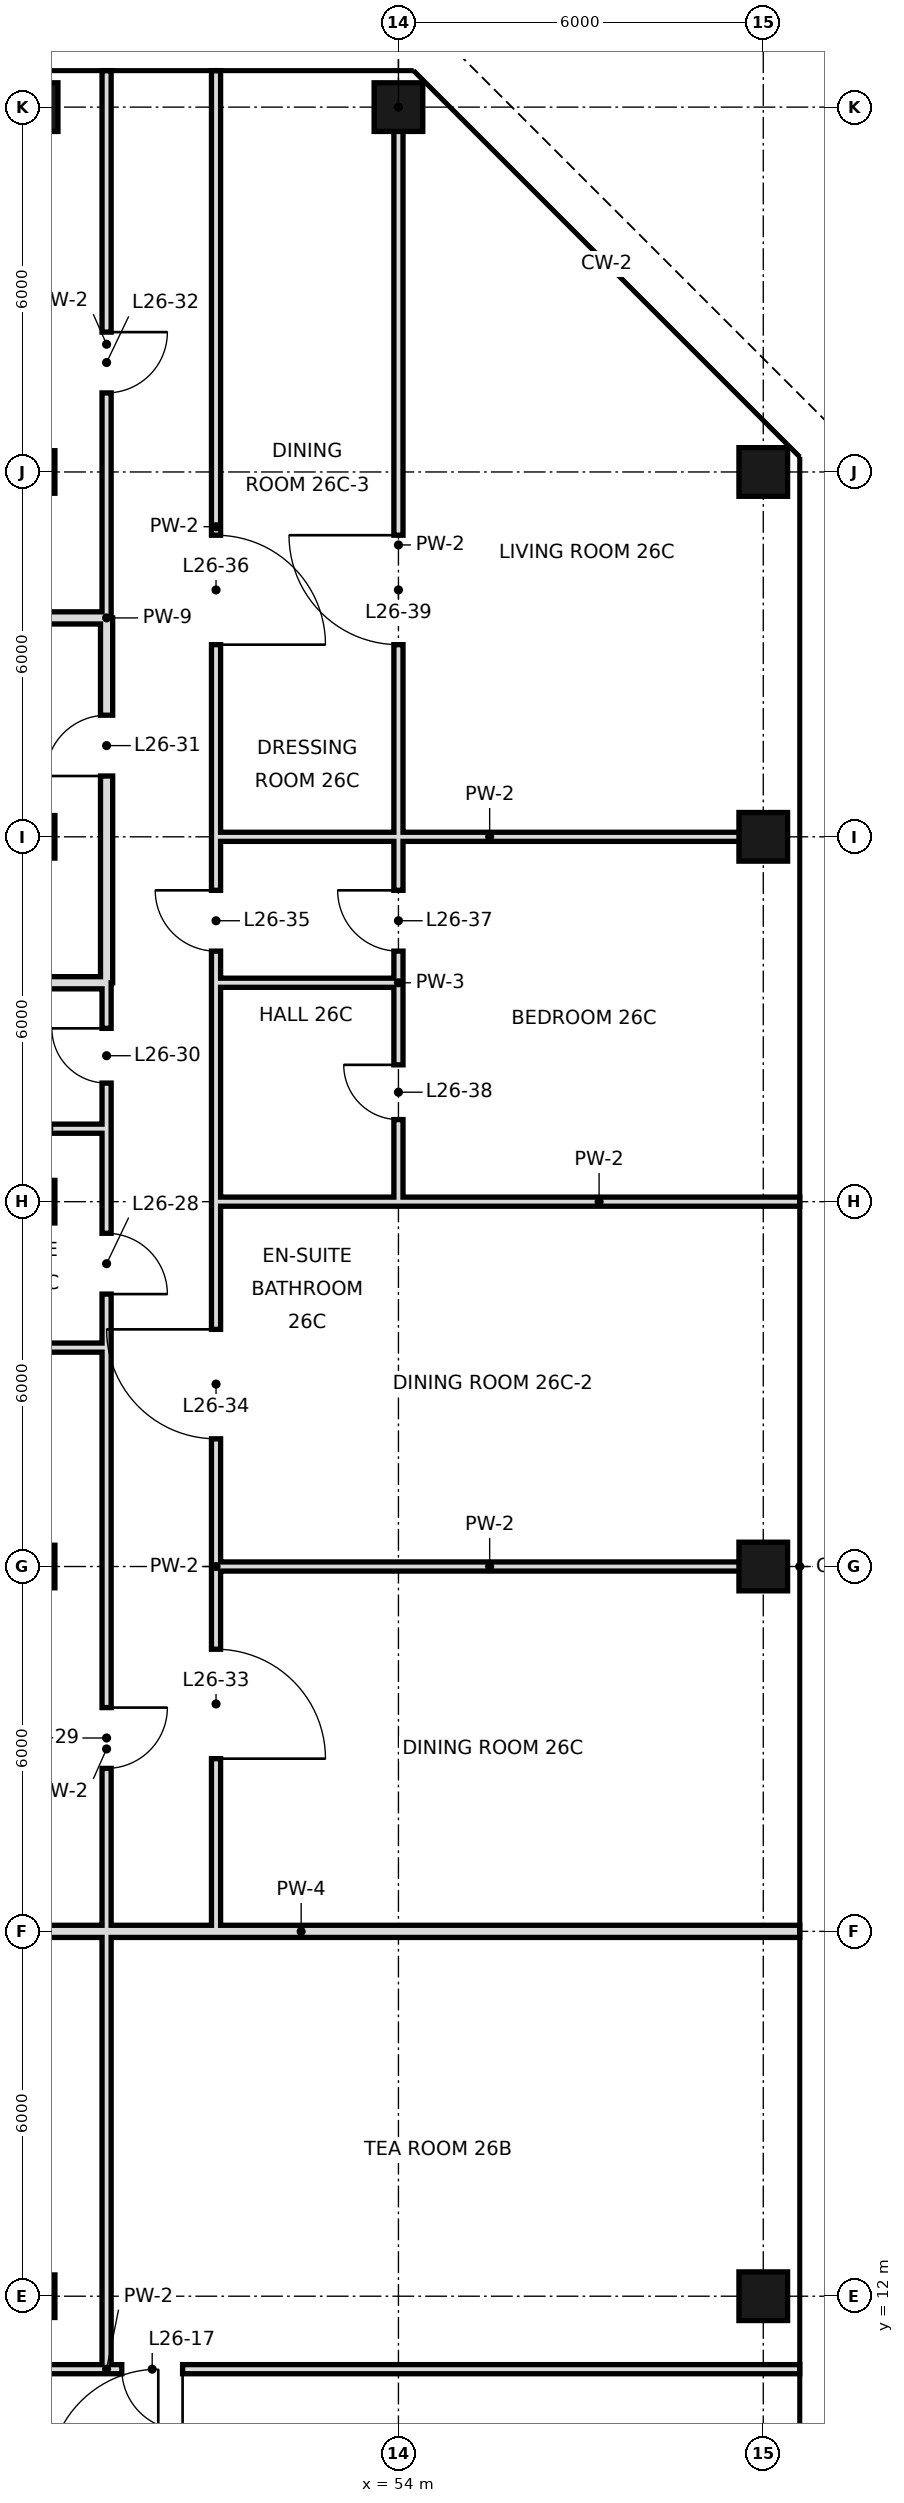
"""IFC4 building model, lengths in metres.
Left out: names, types, materials, properties, quantities, classifications, styles, units other than length and angle.
Written with IfcOpenShell. Run it as: python <this file> out.ifc"""

import sys

from ifc_helpers import new_model, si_unit, direction, frame, frame_2d, origin, origin_2d, place, context, subcontext, project, spatial, rectangle, hollow_rectangle, extrude, element, fill, save


model = new_model("IFC4")
c1 = context("Model", 3, precision=1e-05, world=origin(), true_north=direction((0.0, 1.0)))
c2 = subcontext(c1, "Body", "Model", "MODEL_VIEW")
j1 = project(units=[si_unit("LENGTHUNIT", "METRE"), si_unit("PLANEANGLEUNIT", "RADIAN")], contexts=[c1])
p1 = place(None, origin())
s1 = spatial("IfcSite", under=j1, at=p1, CompositionType="ELEMENT")
p2 = place(p1, origin())
s2 = spatial("IfcBuilding", under=s1, at=p2, CompositionType="ELEMENT")
p3 = place(p2, frame((0.0, 0.0, 119.6)))
s3 = spatial("IfcBuildingStorey", under=s2, at=p3, CompositionType="ELEMENT", Elevation=119.6)
for number, where, z_axis, x_axis in (
    (1, (48.0, 12.0, 0.0), (0.0, 0.0, 1.0), (1.0, 0.0, 0.0)),
    (2, (48.0, 24.0, 0.0), (0.0, 0.0, 1.0), (1.0, 0.0, 0.0)),
    (3, (48.0, 30.0, 0.0), (0.0, 0.0, 1.0), (1.0, 0.0, 0.0)),
    (4, (48.0, 36.0, 0.0), (0.0, 0.0, 1.0), (1.0, 0.0, 0.0)),
    (5, (48.0, 42.0, 0.0), (0.0, 0.0, 1.0), (1.0, 0.0, 0.0)),
):
    element("IfcColumn", number, at=place(p3, frame(where, z_axis=z_axis, x_axis=x_axis)), inside=s3, PredefinedType="COLUMN", context=c2, shape_type="SweptSolid", body=[
        extrude(hollow_rectangle(XDim=0.7, YDim=0.7, WallThickness=0.036, at=origin_2d()), origin(), (0.0, 0.0, 1.0), 3.6),
    ])
for number, where, z_axis, x_axis in (
    (6, (48.0, 48.0, 0.0), (0.0, 0.0, 1.0), (1.0, 0.0, 0.0)),
    (7, (54.0, 48.0, 0.0), (0.0, 0.0, 1.0), (1.0, 0.0, 0.0)),
    (8, (60.0, 12.0, 0.0), (0.0, 0.0, 1.0), (1.0, 0.0, 0.0)),
    (9, (60.0, 24.0, 0.0), (0.0, 0.0, 1.0), (1.0, 0.0, 0.0)),
    (10, (60.0, 36.0, 0.0), (0.0, 0.0, 1.0), (1.0, 0.0, 0.0)),
    (11, (60.0, 42.0, 0.0), (0.0, 0.0, 1.0), (1.0, 0.0, 0.0)),
):
    element("IfcColumn", number, at=place(p3, frame(where, z_axis=z_axis, x_axis=x_axis)), inside=s3, PredefinedType="COLUMN", context=c2, shape_type="SweptSolid", body=[
        extrude(hollow_rectangle(XDim=0.8, YDim=0.8, WallThickness=0.04, at=origin_2d()), origin(), (0.0, 0.0, 1.0), 3.6),
    ])
p4 = place(p3, frame((49.2, 33.6, 0.0), z_axis=(0.0, 0.0, 1.0), x_axis=(0.0, 1.0, 0.0)))
e12 = element("IfcWall", 12, at=p4, inside=s3, PredefinedType="SOLIDWALL", context=c2, shape_type="SweptSolid", body=[
    extrude(rectangle(XDim=6.0, YDim=0.2, at=frame_2d((3.0, 0.0))), origin(), (0.0, 0.0, 1.0), 2.72),
])
p5 = place(p4, frame((3.4, 0.0, 0.0)))
e13 = element("IfcOpeningElement", 13, at=p5, cuts=e12, PredefinedType="OPENING", context=c2, shape_type="SweptSolid", body=[
    extrude(rectangle(XDim=1.0, YDim=2.4, at=frame_2d((0.5, 1.2))), frame((0.0, 0.11, 0.0), z_axis=(0.0, -1.0, 0.0), x_axis=(1.0, 0.0, 0.0)), (0.0, 0.0, 1.0), 0.22),
])
p6 = place(p3, frame((49.2, 10.8, 0.0), z_axis=(0.0, 0.0, 1.0), x_axis=(0.0, 1.0, 0.0)))
e14 = element("IfcWall", 14, at=p6, inside=s3, PredefinedType="PARTITIONING", context=c2, shape_type="SweptSolid", body=[
    extrude(rectangle(XDim=20.4, YDim=0.15, at=frame_2d((10.2, 0.0))), origin(), (0.0, 0.0, 1.0), 3.42),
])
p7 = place(p6, frame((17.68, 0.0, 0.0)))
e15 = element("IfcOpeningElement", 15, at=p7, cuts=e14, PredefinedType="OPENING", context=c2, shape_type="SweptSolid", body=[
    extrude(rectangle(XDim=1.0, YDim=2.4, at=frame_2d((0.5, 1.2))), frame((0.0, 0.085, 0.0), z_axis=(0.0, -1.0, 0.0), x_axis=(1.0, 0.0, 0.0)), (0.0, 0.0, 1.0), 0.17),
])
p8 = place(p6, frame((9.88, 0.0, 0.0)))
e16 = element("IfcOpeningElement", 16, at=p8, cuts=e14, PredefinedType="OPENING", context=c2, shape_type="SweptSolid", body=[
    extrude(rectangle(XDim=1.0, YDim=2.4, at=frame_2d((0.5, 1.2))), frame((0.0, 0.085, 0.0), z_axis=(0.0, -1.0, 0.0), x_axis=(1.0, 0.0, 0.0)), (0.0, 0.0, 1.0), 0.17),
])
p9 = place(p3, frame((49.2, 39.6, 0.0), z_axis=(0.0, 0.0, 1.0), x_axis=(0.0, 1.0, 0.0)))
e17 = element("IfcWall", 17, at=p9, inside=s3, PredefinedType="PARTITIONING", context=c2, shape_type="SweptSolid", body=[
    extrude(rectangle(XDim=9.0, YDim=0.15, at=frame_2d((4.5, 0.0))), origin(), (0.0, 0.0, 1.0), 3.42),
])
p10 = place(p9, frame((3.7, 0.0, 0.0)))
e18 = element("IfcOpeningElement", 18, at=p10, cuts=e17, PredefinedType="OPENING", context=c2, shape_type="SweptSolid", body=[
    extrude(rectangle(XDim=1.0, YDim=2.4, at=frame_2d((0.5, 1.2))), frame((0.0, 0.085, 0.0), z_axis=(0.0, -1.0, 0.0), x_axis=(1.0, 0.0, 0.0)), (0.0, 0.0, 1.0), 0.17),
])
p11 = place(p3, frame((49.2, 31.2, 0.0), z_axis=(0.0, 0.0, 1.0), x_axis=(0.0, 1.0, 0.0)))
e19 = element("IfcWall", 19, at=p11, inside=s3, PredefinedType="PARTITIONING", context=c2, shape_type="SweptSolid", body=[
    extrude(rectangle(XDim=2.4, YDim=0.15, at=frame_2d((1.2, 0.0))), origin(), (0.0, 0.0, 1.0), 3.42),
])
p12 = place(p11, frame((0.75, 0.0, 0.0)))
e20 = element("IfcOpeningElement", 20, at=p12, cuts=e19, PredefinedType="OPENING", context=c2, shape_type="SweptSolid", body=[
    extrude(rectangle(XDim=0.9, YDim=2.4, at=frame_2d((0.45, 1.2))), frame((0.0, 0.085, 0.0), z_axis=(0.0, -1.0, 0.0), x_axis=(1.0, 0.0, 0.0)), (0.0, 0.0, 1.0), 0.17),
])
p13 = place(p3, frame((51.0, 18.0, 0.0), z_axis=(0.0, 0.0, 1.0), x_axis=(0.0, 1.0, 0.0)))
e21 = element("IfcWall", 21, at=p13, inside=s3, PredefinedType="PARTITIONING", context=c2, shape_type="SweptSolid", body=[
    extrude(rectangle(XDim=12.0, YDim=0.15, at=frame_2d((6.0, 0.0))), origin(), (0.0, 0.0, 1.0), 3.42),
])
p14 = place(p13, frame((2.84, 0.0, 0.0)))
e22 = element("IfcOpeningElement", 22, at=p14, cuts=e21, PredefinedType="OPENING", context=c2, shape_type="SweptSolid", body=[
    extrude(rectangle(XDim=1.8, YDim=2.4, at=frame_2d((0.9, 1.2))), frame((0.0, 0.085, 0.0), z_axis=(0.0, -1.0, 0.0), x_axis=(1.0, 0.0, 0.0)), (0.0, 0.0, 1.0), 0.17),
])
p15 = place(p13, frame((8.1, 0.0, 0.0)))
e23 = element("IfcOpeningElement", 23, at=p15, cuts=e21, PredefinedType="OPENING", context=c2, shape_type="SweptSolid", body=[
    extrude(rectangle(XDim=1.8, YDim=2.4, at=frame_2d((0.9, 1.2))), frame((0.0, 0.085, 0.0), z_axis=(0.0, -1.0, 0.0), x_axis=(1.0, 0.0, 0.0)), (0.0, 0.0, 1.0), 0.17),
])
p16 = place(p3, frame((51.0, 33.6, 0.0), z_axis=(0.0, 0.0, 1.0), x_axis=(0.0, 1.0, 0.0)))
e24 = element("IfcWall", 24, at=p16, inside=s3, PredefinedType="PARTITIONING", context=c2, shape_type="SweptSolid", body=[
    extrude(rectangle(XDim=15.0, YDim=0.15, at=frame_2d((7.5, 0.0))), origin(), (0.0, 0.0, 1.0), 3.42),
])
p17 = place(p16, frame((0.52, 0.0, 0.0)))
e25 = element("IfcOpeningElement", 25, at=p17, cuts=e24, PredefinedType="OPENING", context=c2, shape_type="SweptSolid", body=[
    extrude(rectangle(XDim=1.0, YDim=2.4, at=frame_2d((0.5, 1.2))), frame((0.0, 0.085, 0.0), z_axis=(0.0, -1.0, 0.0), x_axis=(1.0, 0.0, 0.0)), (0.0, 0.0, 1.0), 0.17),
])
p18 = place(p16, frame((5.56, 0.0, 0.0)))
e26 = element("IfcOpeningElement", 26, at=p18, cuts=e24, PredefinedType="OPENING", context=c2, shape_type="SweptSolid", body=[
    extrude(rectangle(XDim=1.8, YDim=2.4, at=frame_2d((0.9, 1.2))), frame((0.0, 0.085, 0.0), z_axis=(0.0, -1.0, 0.0), x_axis=(1.0, 0.0, 0.0)), (0.0, 0.0, 1.0), 0.17),
])
p19 = place(p3, frame((51.0, 30.0, 0.0), z_axis=(0.0, 0.0, 1.0), x_axis=(0.0, 1.0, 0.0)))
e27 = element("IfcWall", 27, at=p19, inside=s3, PredefinedType="PARTITIONING", context=c2, shape_type="SweptSolid", body=[
    extrude(rectangle(XDim=3.6, YDim=0.15, at=frame_2d((1.8, 0.0))), origin(), (0.0, 0.0, 1.0), 3.42),
])
p20 = place(p3, frame((54.0, 33.6, 0.0), z_axis=(0.0, 0.0, 1.0), x_axis=(0.0, 1.0, 0.0)))
e28 = element("IfcWall", 28, at=p20, inside=s3, PredefinedType="PARTITIONING", context=c2, shape_type="SweptSolid", body=[
    extrude(rectangle(XDim=14.4, YDim=0.15, at=frame_2d((7.2, 0.0))), origin(), (0.0, 0.0, 1.0), 3.42),
])
p21 = place(p20, frame((0.52, 0.0, 0.0)))
e29 = element("IfcOpeningElement", 29, at=p21, cuts=e28, PredefinedType="OPENING", context=c2, shape_type="SweptSolid", body=[
    extrude(rectangle(XDim=1.0, YDim=2.4, at=frame_2d((0.5, 1.2))), frame((0.0, 0.085, 0.0), z_axis=(0.0, -1.0, 0.0), x_axis=(1.0, 0.0, 0.0)), (0.0, 0.0, 1.0), 0.17),
])
p22 = place(p20, frame((5.56, 0.0, 0.0)))
e30 = element("IfcOpeningElement", 30, at=p22, cuts=e28, PredefinedType="OPENING", context=c2, shape_type="SweptSolid", body=[
    extrude(rectangle(XDim=1.8, YDim=2.4, at=frame_2d((0.9, 1.2))), frame((0.0, 0.085, 0.0), z_axis=(0.0, -1.0, 0.0), x_axis=(1.0, 0.0, 0.0)), (0.0, 0.0, 1.0), 0.17),
])
p23 = place(p3, frame((54.0, 30.0, 0.0), z_axis=(0.0, 0.0, 1.0), x_axis=(0.0, 1.0, 0.0)))
e31 = element("IfcWall", 31, at=p23, inside=s3, PredefinedType="PARTITIONING", context=c2, shape_type="SweptSolid", body=[
    extrude(rectangle(XDim=3.6, YDim=0.15, at=frame_2d((1.8, 0.0))), origin(), (0.0, 0.0, 1.0), 3.42),
])
p24 = place(p23, frame((1.35, 0.0, 0.0)))
e32 = element("IfcOpeningElement", 32, at=p24, cuts=e31, PredefinedType="OPENING", context=c2, shape_type="SweptSolid", body=[
    extrude(rectangle(XDim=0.9, YDim=2.4, at=frame_2d((0.45, 1.2))), frame((0.0, 0.085, 0.0), z_axis=(0.0, -1.0, 0.0), x_axis=(1.0, 0.0, 0.0)), (0.0, 0.0, 1.0), 0.17),
])
p25 = place(p3, frame((37.8, 10.8, 0.0), z_axis=(0.0, 0.0, 1.0), x_axis=(1.0, 0.0, 0.0)))
e33 = element("IfcWall", 33, at=p25, inside=s3, PredefinedType="PARTITIONING", context=c2, shape_type="SweptSolid", body=[
    extrude(rectangle(XDim=22.8, YDim=0.15, at=frame_2d((11.4, 0.0))), origin(), (0.0, 0.0, 1.0), 3.42),
])
p26 = place(p25, frame((5.2, 0.0, 0.0)))
e34 = element("IfcOpeningElement", 34, at=p26, cuts=e33, PredefinedType="OPENING", context=c2, shape_type="SweptSolid", body=[
    extrude(rectangle(XDim=1.0, YDim=2.4, at=frame_2d((0.5, 1.2))), frame((0.0, 0.085, 0.0), z_axis=(0.0, -1.0, 0.0), x_axis=(1.0, 0.0, 0.0)), (0.0, 0.0, 1.0), 0.17),
])
p27 = place(p25, frame((11.65, 0.0, 0.0)))
e35 = element("IfcOpeningElement", 35, at=p27, cuts=e33, PredefinedType="OPENING", context=c2, shape_type="SweptSolid", body=[
    extrude(rectangle(XDim=1.0, YDim=2.4, at=frame_2d((0.5, 1.2))), frame((0.0, 0.085, 0.0), z_axis=(0.0, -1.0, 0.0), x_axis=(1.0, 0.0, 0.0)), (0.0, 0.0, 1.0), 0.17),
])
p28 = place(p3, frame((44.9, 18.0, 0.0), z_axis=(0.0, 0.0, 1.0), x_axis=(1.0, 0.0, 0.0)))
e36 = element("IfcWall", 36, at=p28, inside=s3, PredefinedType="SOLIDWALL", context=c2, shape_type="SweptSolid", body=[
    extrude(rectangle(XDim=15.7, YDim=0.2, at=frame_2d((7.85, 0.0))), origin(), (0.0, 0.0, 1.0), 2.72),
])
p29 = place(p3, frame((51.0, 24.0, 0.0), z_axis=(0.0, 0.0, 1.0), x_axis=(1.0, 0.0, 0.0)))
e37 = element("IfcWall", 37, at=p29, inside=s3, PredefinedType="PARTITIONING", context=c2, shape_type="SweptSolid", body=[
    extrude(rectangle(XDim=9.0, YDim=0.15, at=frame_2d((4.5, 0.0))), origin(), (0.0, 0.0, 1.0), 2.72),
])
p30 = place(p3, frame((44.9, 27.6, 0.0), z_axis=(0.0, 0.0, 1.0), x_axis=(1.0, 0.0, 0.0)))
e38 = element("IfcWall", 38, at=p30, inside=s3, PredefinedType="PARTITIONING", context=c2, shape_type="SweptSolid", body=[
    extrude(rectangle(XDim=4.3, YDim=0.15, at=frame_2d((2.15, 0.0))), origin(), (0.0, 0.0, 1.0), 3.42),
])
p31 = place(p3, frame((54.0, 30.0, 0.0), z_axis=(0.0, 0.0, 1.0), x_axis=(1.0, 0.0, 0.0)))
e39 = element("IfcWall", 39, at=p31, inside=s3, PredefinedType="PARTITIONING", context=c2, shape_type="SweptSolid", body=[
    extrude(rectangle(XDim=6.6, YDim=0.15, at=frame_2d((3.3, 0.0))), origin(), (0.0, 0.0, 1.0), 2.72),
])
p32 = place(p3, frame((51.0, 30.0, 0.0), z_axis=(0.0, 0.0, 1.0), x_axis=(1.0, 0.0, 0.0)))
e40 = element("IfcWall", 40, at=p32, inside=s3, PredefinedType="PARTITIONING", context=c2, shape_type="SweptSolid", body=[
    extrude(rectangle(XDim=3.0, YDim=0.15, at=frame_2d((1.5, 0.0))), origin(), (0.0, 0.0, 1.0), 2.72),
])
p33 = place(p3, frame((44.9, 31.2, 0.0), z_axis=(0.0, 0.0, 1.0), x_axis=(1.0, 0.0, 0.0)))
e41 = element("IfcWall", 41, at=p33, inside=s3, PredefinedType="PARTITIONING", context=c2, shape_type="SweptSolid", body=[
    extrude(rectangle(XDim=4.3, YDim=0.15, at=frame_2d((2.15, 0.0))), origin(), (0.0, 0.0, 1.0), 3.42),
])
p34 = place(p3, frame((44.9, 33.6, 0.0), z_axis=(0.0, 0.0, 1.0), x_axis=(1.0, 0.0, 0.0)))
e42 = element("IfcWall", 42, at=p34, inside=s3, PredefinedType="SOLIDWALL", context=c2, shape_type="SweptSolid", body=[
    extrude(rectangle(XDim=4.3, YDim=0.2, at=frame_2d((2.15, 0.0))), origin(), (0.0, 0.0, 1.0), 2.97),
])
p35 = place(p3, frame((51.0, 33.6, 0.0), z_axis=(0.0, 0.0, 1.0), x_axis=(1.0, 0.0, 0.0)))
e43 = element("IfcWall", 43, at=p35, inside=s3, PredefinedType="PARTITIONING", context=c2, shape_type="SweptSolid", body=[
    extrude(rectangle(XDim=3.0, YDim=0.15, at=frame_2d((1.5, 0.0))), origin(), (0.0, 0.0, 1.0), 3.42),
])
p36 = place(p3, frame((51.0, 36.0, 0.0), z_axis=(0.0, 0.0, 1.0), x_axis=(1.0, 0.0, 0.0)))
e44 = element("IfcWall", 44, at=p36, inside=s3, PredefinedType="PARTITIONING", context=c2, shape_type="SweptSolid", body=[
    extrude(rectangle(XDim=9.0, YDim=0.15, at=frame_2d((4.5, 0.0))), origin(), (0.0, 0.0, 1.0), 2.72),
])
p37 = place(p3, frame((44.9, 39.6, 0.0), z_axis=(0.0, 0.0, 1.0), x_axis=(1.0, 0.0, 0.0)))
e45 = element("IfcWall", 45, at=p37, inside=s3, PredefinedType="SOLIDWALL", context=c2, shape_type="SweptSolid", body=[
    extrude(rectangle(XDim=4.3, YDim=0.2, at=frame_2d((2.15, 0.0))), origin(), (0.0, 0.0, 1.0), 2.97),
])
p38 = place(p27, origin())
e46 = element("IfcDoor", 46, at=p38, inside=s3, OperationType="SINGLE_SWING_RIGHT", PredefinedType="DOOR", context=c2, shape_type="SweptSolid", body=[
    extrude(rectangle(XDim=1.0, YDim=2.4, at=frame_2d((0.5, 1.2))), frame((0.0, 0.025, 0.0), z_axis=(0.0, -1.0, 0.0), x_axis=(1.0, 0.0, 0.0)), (0.0, 0.0, 1.0), 0.05),
])
fill(e35, e46)
p39 = place(p7, frame((1.0, 0.0, 0.0), z_axis=(0.0, 0.0, 1.0), x_axis=(-1.0, 0.0, 0.0)))
e47 = element("IfcDoor", 47, at=p39, inside=s3, OperationType="SINGLE_SWING_RIGHT", PredefinedType="DOOR", context=c2, shape_type="SweptSolid", body=[
    extrude(rectangle(XDim=1.0, YDim=2.4, at=frame_2d((0.5, 1.2))), frame((0.0, 0.025, 0.0), z_axis=(0.0, -1.0, 0.0), x_axis=(1.0, 0.0, 0.0)), (0.0, 0.0, 1.0), 0.05),
])
fill(e15, e47)
p40 = place(p8, origin())
e48 = element("IfcDoor", 48, at=p40, inside=s3, OperationType="SINGLE_SWING_RIGHT", PredefinedType="DOOR", context=c2, shape_type="SweptSolid", body=[
    extrude(rectangle(XDim=1.0, YDim=2.4, at=frame_2d((0.5, 1.2))), frame((0.0, 0.025, 0.0), z_axis=(0.0, -1.0, 0.0), x_axis=(1.0, 0.0, 0.0)), (0.0, 0.0, 1.0), 0.05),
])
fill(e16, e48)
p41 = place(p12, frame((0.9, 0.0, 0.0), z_axis=(0.0, 0.0, 1.0), x_axis=(-1.0, 0.0, 0.0)))
e49 = element("IfcDoor", 49, at=p41, inside=s3, OperationType="SINGLE_SWING_LEFT", PredefinedType="DOOR", context=c2, shape_type="SweptSolid", body=[
    extrude(rectangle(XDim=0.9, YDim=2.4, at=frame_2d((0.45, 1.2))), frame((0.0, 0.025, 0.0), z_axis=(0.0, -1.0, 0.0), x_axis=(1.0, 0.0, 0.0)), (0.0, 0.0, 1.0), 0.05),
])
fill(e20, e49)
p42 = place(p5, origin())
e50 = element("IfcDoor", 50, at=p42, inside=s3, OperationType="SINGLE_SWING_LEFT", PredefinedType="DOOR", context=c2, shape_type="SweptSolid", body=[
    extrude(rectangle(XDim=1.0, YDim=2.4, at=frame_2d((0.5, 1.2))), frame((0.0, 0.025, 0.0), z_axis=(0.0, -1.0, 0.0), x_axis=(1.0, 0.0, 0.0)), (0.0, 0.0, 1.0), 0.05),
])
fill(e13, e50)
p43 = place(p10, origin())
e51 = element("IfcDoor", 51, at=p43, inside=s3, OperationType="SINGLE_SWING_RIGHT", PredefinedType="DOOR", context=c2, shape_type="SweptSolid", body=[
    extrude(rectangle(XDim=1.0, YDim=2.4, at=frame_2d((0.5, 1.2))), frame((0.0, 0.025, 0.0), z_axis=(0.0, -1.0, 0.0), x_axis=(1.0, 0.0, 0.0)), (0.0, 0.0, 1.0), 0.05),
])
fill(e18, e51)
p44 = place(p14, frame((1.8, 0.0, 0.0), z_axis=(0.0, 0.0, 1.0), x_axis=(-1.0, 0.0, 0.0)))
e52 = element("IfcDoor", 52, at=p44, inside=s3, OperationType="SINGLE_SWING_RIGHT", PredefinedType="DOOR", context=c2, shape_type="SweptSolid", body=[
    extrude(rectangle(XDim=1.8, YDim=2.4, at=frame_2d((0.9, 1.2))), frame((0.0, 0.025, 0.0), z_axis=(0.0, -1.0, 0.0), x_axis=(1.0, 0.0, 0.0)), (0.0, 0.0, 1.0), 0.05),
])
fill(e22, e52)
p45 = place(p15, frame((1.8, 0.0, 0.0), z_axis=(0.0, 0.0, 1.0), x_axis=(-1.0, 0.0, 0.0)))
e53 = element("IfcDoor", 53, at=p45, inside=s3, OperationType="SINGLE_SWING_LEFT", PredefinedType="DOOR", context=c2, shape_type="SweptSolid", body=[
    extrude(rectangle(XDim=1.8, YDim=2.4, at=frame_2d((0.9, 1.2))), frame((0.0, 0.025, 0.0), z_axis=(0.0, -1.0, 0.0), x_axis=(1.0, 0.0, 0.0)), (0.0, 0.0, 1.0), 0.05),
])
fill(e23, e53)
p46 = place(p17, frame((1.0, 0.0, 0.0), z_axis=(0.0, 0.0, 1.0), x_axis=(-1.0, 0.0, 0.0)))
e54 = element("IfcDoor", 54, at=p46, inside=s3, OperationType="SINGLE_SWING_LEFT", PredefinedType="DOOR", context=c2, shape_type="SweptSolid", body=[
    extrude(rectangle(XDim=1.0, YDim=2.4, at=frame_2d((0.5, 1.2))), frame((0.0, 0.025, 0.0), z_axis=(0.0, -1.0, 0.0), x_axis=(1.0, 0.0, 0.0)), (0.0, 0.0, 1.0), 0.05),
])
fill(e25, e54)
p47 = place(p18, frame((1.8, 0.0, 0.0), z_axis=(0.0, 0.0, 1.0), x_axis=(-1.0, 0.0, 0.0)))
e55 = element("IfcDoor", 55, at=p47, inside=s3, OperationType="SINGLE_SWING_RIGHT", PredefinedType="DOOR", context=c2, shape_type="SweptSolid", body=[
    extrude(rectangle(XDim=1.8, YDim=2.4, at=frame_2d((0.9, 1.2))), frame((0.0, 0.025, 0.0), z_axis=(0.0, -1.0, 0.0), x_axis=(1.0, 0.0, 0.0)), (0.0, 0.0, 1.0), 0.05),
])
fill(e26, e55)
p48 = place(p21, frame((1.0, 0.0, 0.0), z_axis=(0.0, 0.0, 1.0), x_axis=(-1.0, 0.0, 0.0)))
e56 = element("IfcDoor", 56, at=p48, inside=s3, OperationType="SINGLE_SWING_LEFT", PredefinedType="DOOR", context=c2, shape_type="SweptSolid", body=[
    extrude(rectangle(XDim=1.0, YDim=2.4, at=frame_2d((0.5, 1.2))), frame((0.0, 0.025, 0.0), z_axis=(0.0, -1.0, 0.0), x_axis=(1.0, 0.0, 0.0)), (0.0, 0.0, 1.0), 0.05),
])
fill(e29, e56)
p49 = place(p24, frame((0.9, 0.0, 0.0), z_axis=(0.0, 0.0, 1.0), x_axis=(-1.0, 0.0, 0.0)))
e57 = element("IfcDoor", 57, at=p49, inside=s3, OperationType="SINGLE_SWING_LEFT", PredefinedType="DOOR", context=c2, shape_type="SweptSolid", body=[
    extrude(rectangle(XDim=0.9, YDim=2.4, at=frame_2d((0.45, 1.2))), frame((0.0, 0.025, 0.0), z_axis=(0.0, -1.0, 0.0), x_axis=(1.0, 0.0, 0.0)), (0.0, 0.0, 1.0), 0.05),
])
fill(e32, e57)
p50 = place(p22, frame((1.8, 0.0, 0.0), z_axis=(0.0, 0.0, 1.0), x_axis=(-1.0, 0.0, 0.0)))
e58 = element("IfcDoor", 58, at=p50, inside=s3, OperationType="SINGLE_SWING_LEFT", PredefinedType="DOOR", context=c2, shape_type="SweptSolid", body=[
    extrude(rectangle(XDim=1.8, YDim=2.4, at=frame_2d((0.9, 1.2))), frame((0.0, 0.025, 0.0), z_axis=(0.0, -1.0, 0.0), x_axis=(1.0, 0.0, 0.0)), (0.0, 0.0, 1.0), 0.05),
])
fill(e30, e58)
save(model, sys.argv[1])
